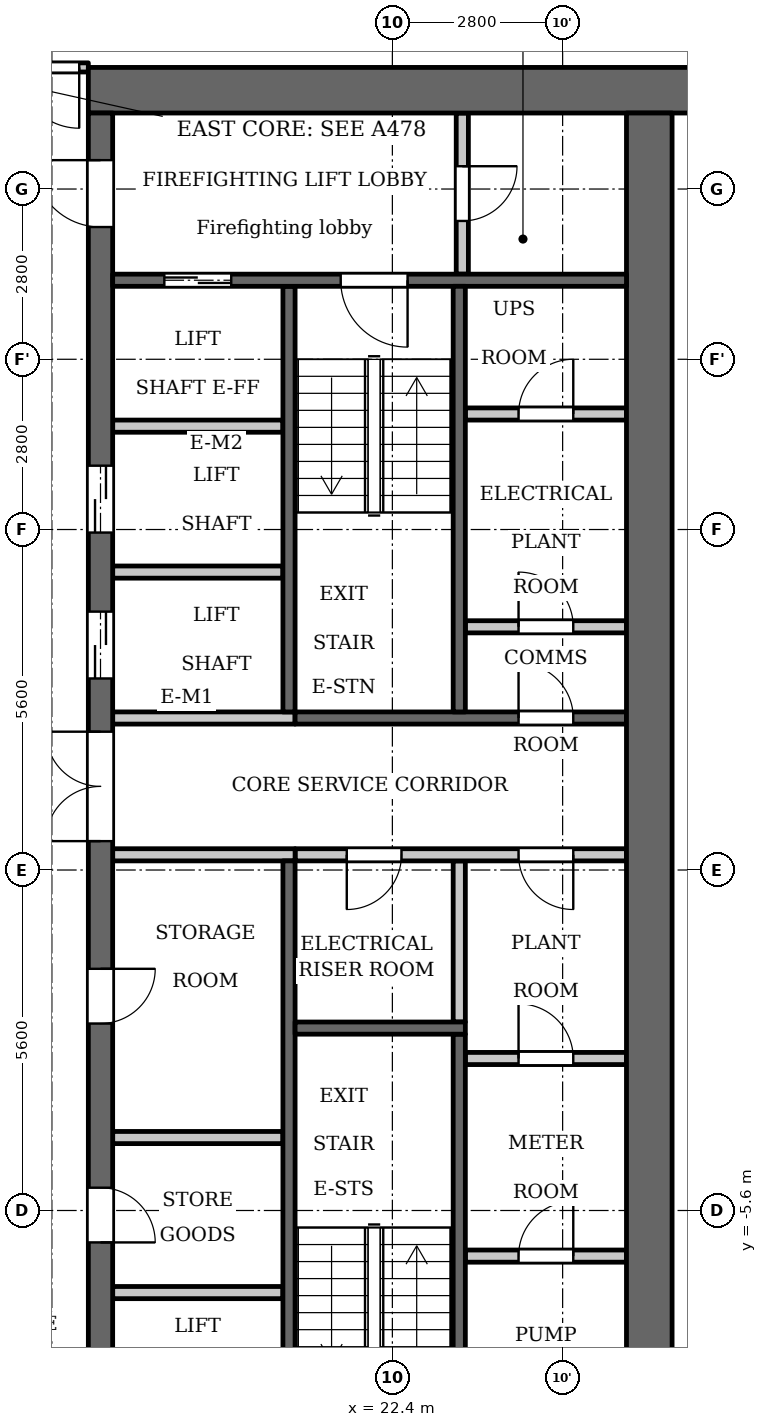
"""IFC4 building model, lengths in metres.
Left out: names, types, materials, properties, quantities, classifications, styles, units other than length and angle.
Written with IfcOpenShell. Run it as: python <this file> out.ifc"""

import sys

from ifc_helpers import new_model, si_unit, direction, frame, frame_2d, origin, place, context, subcontext, project, spatial, rectangle, extrude, element, fill, save


model = new_model("IFC4")
c1 = context("Model", 3, precision=1e-05, world=origin(), true_north=direction((0.0, 1.0)))
c2 = subcontext(c1, "Body", "Model", "MODEL_VIEW")
j1 = project(units=[si_unit("LENGTHUNIT", "METRE"), si_unit("PLANEANGLEUNIT", "RADIAN")], contexts=[c1])
p1 = place(None, origin())
s1 = spatial("IfcSite", under=j1, at=p1, CompositionType="ELEMENT")
p2 = place(p1, origin())
s2 = spatial("IfcBuilding", under=s1, at=p2, CompositionType="ELEMENT")
p3 = place(p2, frame((0.0, 0.0, 146.6)))
s3 = spatial("IfcBuildingStorey", under=s2, at=p3, CompositionType="ELEMENT", Elevation=146.6)
p4 = place(p3, frame((23.5, -2.5, 0.0), z_axis=(0.0, 0.0, 1.0), x_axis=(0.0, 1.0, 0.0)))
e1 = element("IfcWall", 1, at=p4, inside=s3, PredefinedType="PARTITIONING", context=c2, shape_type="SweptSolid", body=[
    extrude(rectangle(XDim=2.65, YDim=0.2, at=frame_2d((1.325, 0.0))), origin(), (0.0, 0.0, 1.0), 3.2),
])
p5 = place(p3, frame((20.7, 2.6, 0.0), z_axis=(0.0, 0.0, 1.0), x_axis=(0.0, 1.0, 0.0)))
e2 = element("IfcWall", 2, at=p5, inside=s3, PredefinedType="SHEAR", context=c2, shape_type="SweptSolid", body=[
    extrude(rectangle(XDim=7.0, YDim=0.2, at=frame_2d((3.5, 0.0))), origin(), (0.0, 0.0, 1.0), 3.2),
])
p6 = place(p3, frame((20.7, -9.6, 0.0), z_axis=(0.0, 0.0, 1.0), x_axis=(0.0, 1.0, 0.0)))
e3 = element("IfcWall", 3, at=p6, inside=s3, PredefinedType="SHEAR", context=c2, shape_type="SweptSolid", body=[
    extrude(rectangle(XDim=9.75, YDim=0.2, at=frame_2d((4.875, 0.0))), origin(), (0.0, 0.0, 1.0), 3.2),
])
p7 = place(p3, frame((20.8, 2.5, 0.0), z_axis=(0.0, 0.0, 1.0), x_axis=(1.0, 0.0, 0.0)))
e4 = element("IfcWall", 4, at=p7, inside=s3, PredefinedType="SHEAR", context=c2, shape_type="SweptSolid", body=[
    extrude(rectangle(XDim=5.45, YDim=0.2, at=frame_2d((2.725, 0.0))), origin(), (0.0, 0.0, 1.0), 3.2),
])
p8 = place(p7, frame((3.675, 0.0, 0.0)))
e5 = element("IfcOpeningElement", 5, at=p8, cuts=e4, PredefinedType="OPENING", context=c2, shape_type="SweptSolid", body=[
    extrude(rectangle(XDim=0.9, YDim=2.1, at=frame_2d((0.45, 1.05))), frame((0.0, 0.11, 0.0), z_axis=(0.0, -1.0, 0.0), x_axis=(1.0, 0.0, 0.0)), (0.0, 0.0, 1.0), 0.22),
])
p9 = place(p3, frame((20.8, 0.25, 0.0), z_axis=(0.0, 0.0, 1.0), x_axis=(1.0, 0.0, 0.0)))
e6 = element("IfcWall", 6, at=p9, inside=s3, PredefinedType="PARTITIONING", context=c2, shape_type="SweptSolid", body=[
    extrude(rectangle(XDim=5.45, YDim=0.2, at=frame_2d((2.725, 0.0))), origin(), (0.0, 0.0, 1.0), 3.2),
])
p10 = place(p9, frame((0.85, 0.0, 0.0)))
e7 = element("IfcOpeningElement", 7, at=p10, cuts=e6, PredefinedType="OPENING", context=c2, shape_type="SweptSolid", body=[
    extrude(rectangle(XDim=0.9, YDim=2.1, at=frame_2d((0.45, 1.05))), frame((0.0, 0.11, 0.0), z_axis=(0.0, -1.0, 0.0), x_axis=(1.0, 0.0, 0.0)), (0.0, 0.0, 1.0), 0.22),
])
p11 = place(p9, frame((3.675, 0.0, 0.0)))
e8 = element("IfcOpeningElement", 8, at=p11, cuts=e6, PredefinedType="OPENING", context=c2, shape_type="SweptSolid", body=[
    extrude(rectangle(XDim=0.9, YDim=2.1, at=frame_2d((0.45, 1.05))), frame((0.0, 0.11, 0.0), z_axis=(0.0, -1.0, 0.0), x_axis=(1.0, 0.0, 0.0)), (0.0, 0.0, 1.0), 0.22),
])
p12 = place(p3, frame((17.4, 12.825, 0.0), z_axis=(0.0, 0.0, 1.0), x_axis=(1.0, 0.0, 0.0)))
e9 = element("IfcWall", 9, at=p12, inside=s3, PredefinedType="SHEAR", context=c2, shape_type="SweptSolid", body=[
    extrude(rectangle(XDim=10.4, YDim=0.75, at=frame_2d((5.2, 0.0))), origin(), (0.0, 0.0, 1.0), 3.2),
])
p13 = place(p3, frame((17.8, -4.4, 0.0), z_axis=(0.0, 0.0, 1.0), x_axis=(1.0, 0.0, 0.0)))
e10 = element("IfcWall", 10, at=p13, inside=s3, PredefinedType="PARTITIONING", context=c2, shape_type="SweptSolid", body=[
    extrude(rectangle(XDim=2.8, YDim=0.2, at=frame_2d((1.4, 0.0))), origin(), (0.0, 0.0, 1.0), 3.2),
])
p14 = place(p3, frame((17.6, -12.45, 0.0), z_axis=(0.0, 0.0, 1.0), x_axis=(0.0, 1.0, 0.0)))
e11 = element("IfcWall", 11, at=p14, inside=s3, PredefinedType="SHEAR", context=c2, shape_type="SweptSolid", body=[
    extrude(rectangle(XDim=24.9, YDim=0.4, at=frame_2d((12.45, 0.0))), origin(), (0.0, 0.0, 1.0), 3.2),
])
p15 = place(p14, frame((6.325, 0.0, 0.0)))
e12 = element("IfcOpeningElement", 12, at=p15, cuts=e11, PredefinedType="OPENING", context=c2, shape_type="SweptSolid", body=[
    extrude(rectangle(XDim=0.9, YDim=2.1, at=frame_2d((0.45, 1.05))), frame((0.0, 0.21, 0.0), z_axis=(0.0, -1.0, 0.0), x_axis=(1.0, 0.0, 0.0)), (0.0, 0.0, 1.0), 0.42),
])
p16 = place(p14, frame((9.925, 0.0, 0.0)))
e13 = element("IfcOpeningElement", 13, at=p16, cuts=e11, PredefinedType="OPENING", context=c2, shape_type="SweptSolid", body=[
    extrude(rectangle(XDim=0.9, YDim=2.1, at=frame_2d((0.45, 1.05))), frame((0.0, 0.21, 0.0), z_axis=(0.0, -1.0, 0.0), x_axis=(1.0, 0.0, 0.0)), (0.0, 0.0, 1.0), 0.42),
])
p17 = place(p14, frame((15.6, 0.0, 0.0)))
e14 = element("IfcOpeningElement", 14, at=p17, cuts=e11, PredefinedType="OPENING", context=c2, shape_type="SweptSolid", body=[
    extrude(rectangle(XDim=1.1, YDim=2.1, at=frame_2d((0.55, 1.05))), frame((0.0, 0.21, 0.0), z_axis=(0.0, -1.0, 0.0), x_axis=(1.0, 0.0, 0.0)), (0.0, 0.0, 1.0), 0.42),
])
p18 = place(p14, frame((18.0, 0.0, 0.0)))
e15 = element("IfcOpeningElement", 15, at=p18, cuts=e11, PredefinedType="OPENING", context=c2, shape_type="SweptSolid", body=[
    extrude(rectangle(XDim=1.1, YDim=2.1, at=frame_2d((0.55, 1.05))), frame((0.0, 0.21, 0.0), z_axis=(0.0, -1.0, 0.0), x_axis=(1.0, 0.0, 0.0)), (0.0, 0.0, 1.0), 0.42),
])
p19 = place(p14, frame((23.025, 0.0, 0.0)))
e16 = element("IfcOpeningElement", 16, at=p19, cuts=e11, PredefinedType="OPENING", context=c2, shape_type="SweptSolid", body=[
    extrude(rectangle(XDim=1.1, YDim=2.1, at=frame_2d((0.55, 1.05))), frame((0.0, 0.21, 0.0), z_axis=(0.0, -1.0, 0.0), x_axis=(1.0, 0.0, 0.0)), (0.0, 0.0, 1.0), 0.42),
])
p20 = place(p14, frame((0.775, 0.0, 0.0)))
e17 = element("IfcOpeningElement", 17, at=p20, cuts=e11, PredefinedType="OPENING", context=c2, shape_type="SweptSolid", body=[
    extrude(rectangle(XDim=1.1, YDim=2.1, at=frame_2d((0.55, 1.05))), frame((0.0, 0.21, 0.0), z_axis=(0.0, -1.0, 0.0), x_axis=(1.0, 0.0, 0.0)), (0.0, 0.0, 1.0), 0.42),
])
p21 = place(p14, frame((12.925, 0.0, 0.0)))
e18 = element("IfcOpeningElement", 18, at=p21, cuts=e11, PredefinedType="OPENING", context=c2, shape_type="SweptSolid", body=[
    extrude(rectangle(XDim=1.8, YDim=2.1, at=frame_2d((0.9, 1.05))), frame((0.0, 0.21, 0.0), z_axis=(0.0, -1.0, 0.0), x_axis=(1.0, 0.0, 0.0)), (0.0, 0.0, 1.0), 0.42),
])
p22 = place(p3, frame((26.625, -12.45, 0.0), z_axis=(0.0, 0.0, 1.0), x_axis=(0.0, 1.0, 0.0)))
e19 = element("IfcWall", 19, at=p22, inside=s3, PredefinedType="SHEAR", context=c2, shape_type="SweptSolid", body=[
    extrude(rectangle(XDim=24.9, YDim=0.75, at=frame_2d((12.45, 0.0))), origin(), (0.0, 0.0, 1.0), 3.2),
])
p23 = place(p3, frame((23.55, 9.8, 0.0), z_axis=(0.0, 0.0, 1.0), x_axis=(0.0, 1.0, 0.0)))
e20 = element("IfcWall", 20, at=p23, inside=s3, PredefinedType="PARTITIONING", context=c2, shape_type="SweptSolid", body=[
    extrude(rectangle(XDim=2.65, YDim=0.2, at=frame_2d((1.325, 0.0))), origin(), (0.0, 0.0, 1.0), 3.2),
])
p24 = place(p23, frame((0.875, 0.0, 0.0)))
e21 = element("IfcOpeningElement", 21, at=p24, cuts=e20, PredefinedType="OPENING", context=c2, shape_type="SweptSolid", body=[
    extrude(rectangle(XDim=0.9, YDim=2.1, at=frame_2d((0.45, 1.05))), frame((0.0, 0.11, 0.0), z_axis=(0.0, -1.0, 0.0), x_axis=(1.0, 0.0, 0.0)), (0.0, 0.0, 1.0), 0.22),
])
p25 = place(p3, frame((23.6, -6.35, 0.0), z_axis=(0.0, 0.0, 1.0), x_axis=(1.0, 0.0, 0.0)))
e22 = element("IfcWall", 22, at=p25, inside=s3, PredefinedType="PARTITIONING", context=c2, shape_type="SweptSolid", body=[
    extrude(rectangle(XDim=2.65, YDim=0.2, at=frame_2d((1.325, 0.0))), origin(), (0.0, 0.0, 1.0), 3.2),
])
p26 = place(p25, frame((0.875, 0.0, 0.0)))
e23 = element("IfcOpeningElement", 23, at=p26, cuts=e22, PredefinedType="OPENING", context=c2, shape_type="SweptSolid", body=[
    extrude(rectangle(XDim=0.9, YDim=2.1, at=frame_2d((0.45, 1.05))), frame((0.0, 0.11, 0.0), z_axis=(0.0, -1.0, 0.0), x_axis=(1.0, 0.0, 0.0)), (0.0, 0.0, 1.0), 0.22),
])
p27 = place(p3, frame((23.6, -3.1, 0.0), z_axis=(0.0, 0.0, 1.0), x_axis=(1.0, 0.0, 0.0)))
e24 = element("IfcWall", 24, at=p27, inside=s3, PredefinedType="PARTITIONING", context=c2, shape_type="SweptSolid", body=[
    extrude(rectangle(XDim=2.65, YDim=0.2, at=frame_2d((1.325, 0.0))), origin(), (0.0, 0.0, 1.0), 3.2),
])
p28 = place(p27, frame((0.875, 0.0, 0.0)))
e25 = element("IfcOpeningElement", 25, at=p28, cuts=e24, PredefinedType="OPENING", context=c2, shape_type="SweptSolid", body=[
    extrude(rectangle(XDim=0.9, YDim=2.1, at=frame_2d((0.45, 1.05))), frame((0.0, 0.11, 0.0), z_axis=(0.0, -1.0, 0.0), x_axis=(1.0, 0.0, 0.0)), (0.0, 0.0, 1.0), 0.22),
])
p29 = place(p3, frame((23.6, 4.0, 0.0), z_axis=(0.0, 0.0, 1.0), x_axis=(1.0, 0.0, 0.0)))
e26 = element("IfcWall", 26, at=p29, inside=s3, PredefinedType="PARTITIONING", context=c2, shape_type="SweptSolid", body=[
    extrude(rectangle(XDim=2.65, YDim=0.2, at=frame_2d((1.325, 0.0))), origin(), (0.0, 0.0, 1.0), 3.2),
])
p30 = place(p29, frame((0.875, 0.0, 0.0)))
e27 = element("IfcOpeningElement", 27, at=p30, cuts=e26, PredefinedType="OPENING", context=c2, shape_type="SweptSolid", body=[
    extrude(rectangle(XDim=0.9, YDim=2.1, at=frame_2d((0.45, 1.05))), frame((0.0, 0.11, 0.0), z_axis=(0.0, -1.0, 0.0), x_axis=(1.0, 0.0, 0.0)), (0.0, 0.0, 1.0), 0.22),
])
p31 = place(p3, frame((23.6, 7.5, 0.0), z_axis=(0.0, 0.0, 1.0), x_axis=(1.0, 0.0, 0.0)))
e28 = element("IfcWall", 28, at=p31, inside=s3, PredefinedType="PARTITIONING", context=c2, shape_type="SweptSolid", body=[
    extrude(rectangle(XDim=2.65, YDim=0.2, at=frame_2d((1.325, 0.0))), origin(), (0.0, 0.0, 1.0), 3.2),
])
p32 = place(p31, frame((0.875, 0.0, 0.0)))
e29 = element("IfcOpeningElement", 29, at=p32, cuts=e28, PredefinedType="OPENING", context=c2, shape_type="SweptSolid", body=[
    extrude(rectangle(XDim=0.9, YDim=2.1, at=frame_2d((0.45, 1.05))), frame((0.0, 0.11, 0.0), z_axis=(0.0, -1.0, 0.0), x_axis=(1.0, 0.0, 0.0)), (0.0, 0.0, 1.0), 0.22),
])
p33 = place(p3, frame((17.8, -6.95, 0.0), z_axis=(0.0, 0.0, 1.0), x_axis=(1.0, 0.0, 0.0)))
e30 = element("IfcWall", 30, at=p33, inside=s3, PredefinedType="PARTITIONING", context=c2, shape_type="SweptSolid", body=[
    extrude(rectangle(XDim=2.8, YDim=0.2, at=frame_2d((1.4, 0.0))), origin(), (0.0, 0.0, 1.0), 3.2),
])
for number, where, z_axis, x_axis in (
    (31, (17.8, 0.25, 0.0), (0.0, 0.0, 1.0), (1.0, 0.0, 0.0)),
    (32, (17.8, 2.5, 0.0), (0.0, 0.0, 1.0), (1.0, 0.0, 0.0)),
):
    element("IfcWall", number, at=place(p3, frame(where, z_axis=z_axis, x_axis=x_axis)), inside=s3, PredefinedType="PARTITIONING", context=c2, shape_type="SweptSolid", body=[
        extrude(rectangle(XDim=3.0, YDim=0.2, at=frame_2d((1.5, 0.0))), origin(), (0.0, 0.0, 1.0), 3.2),
    ])
for number, where, z_axis, x_axis in (
    (33, (17.8, 4.9, 0.0), (0.0, 0.0, 1.0), (1.0, 0.0, 0.0)),
    (34, (17.8, 7.3, 0.0), (0.0, 0.0, 1.0), (1.0, 0.0, 0.0)),
):
    element("IfcWall", number, at=place(p3, frame(where, z_axis=z_axis, x_axis=x_axis)), inside=s3, PredefinedType="PARTITIONING", context=c2, shape_type="SweptSolid", body=[
        extrude(rectangle(XDim=2.8, YDim=0.2, at=frame_2d((1.4, 0.0))), origin(), (0.0, 0.0, 1.0), 3.2),
    ])
p34 = place(p3, frame((17.8, 9.7, 0.0), z_axis=(0.0, 0.0, 1.0), x_axis=(1.0, 0.0, 0.0)))
e35 = element("IfcWall", 35, at=p34, inside=s3, PredefinedType="SHEAR", context=c2, shape_type="SweptSolid", body=[
    extrude(rectangle(XDim=8.45, YDim=0.2, at=frame_2d((4.225, 0.0))), origin(), (0.0, 0.0, 1.0), 3.2),
])
p35 = place(p34, frame((0.85, 0.0, 0.0)))
e36 = element("IfcOpeningElement", 36, at=p35, cuts=e35, PredefinedType="OPENING", context=c2, shape_type="SweptSolid", body=[
    extrude(rectangle(XDim=1.1, YDim=2.1, at=frame_2d((0.55, 1.05))), frame((0.0, 0.11, 0.0), z_axis=(0.0, -1.0, 0.0), x_axis=(1.0, 0.0, 0.0)), (0.0, 0.0, 1.0), 0.22),
])
p36 = place(p34, frame((3.75, 0.0, 0.0)))
e37 = element("IfcOpeningElement", 37, at=p36, cuts=e35, PredefinedType="OPENING", context=c2, shape_type="SweptSolid", body=[
    extrude(rectangle(XDim=1.1, YDim=2.1, at=frame_2d((0.55, 1.05))), frame((0.0, 0.11, 0.0), z_axis=(0.0, -1.0, 0.0), x_axis=(1.0, 0.0, 0.0)), (0.0, 0.0, 1.0), 0.22),
])
p37 = place(p3, frame((23.5, 2.6, 0.0), z_axis=(0.0, 0.0, 1.0), x_axis=(0.0, 1.0, 0.0)))
e38 = element("IfcWall", 38, at=p37, inside=s3, PredefinedType="SHEAR", context=c2, shape_type="SweptSolid", body=[
    extrude(rectangle(XDim=7.0, YDim=0.2, at=frame_2d((3.5, 0.0))), origin(), (0.0, 0.0, 1.0), 3.2),
])
p38 = place(p3, frame((23.5, -9.6, 0.0), z_axis=(0.0, 0.0, 1.0), x_axis=(0.0, 1.0, 0.0)))
e39 = element("IfcWall", 39, at=p38, inside=s3, PredefinedType="SHEAR", context=c2, shape_type="SweptSolid", body=[
    extrude(rectangle(XDim=6.9, YDim=0.2, at=frame_2d((3.45, 0.0))), origin(), (0.0, 0.0, 1.0), 3.2),
])
p39 = place(p3, frame((20.8, -2.6, 0.0), z_axis=(0.0, 0.0, 1.0), x_axis=(1.0, 0.0, 0.0)))
e40 = element("IfcWall", 40, at=p39, inside=s3, PredefinedType="SHEAR", context=c2, shape_type="SweptSolid", body=[
    extrude(rectangle(XDim=2.8, YDim=0.2, at=frame_2d((1.4, 0.0))), origin(), (0.0, 0.0, 1.0), 3.2),
])
p40 = place(p3, frame((-17.4, 13.2, 0.0), z_axis=(0.0, 0.0, 1.0), x_axis=(1.0, 0.0, 0.0)))
e41 = element("IfcWall", 41, at=p40, inside=s3, PredefinedType="PARTITIONING", context=c2, shape_type="SweptSolid", body=[
    extrude(rectangle(XDim=34.8, YDim=0.15, at=frame_2d((17.4, 0.0))), origin(), (0.0, 0.0, 1.0), 3.2),
])
p41 = place(p40, frame((0.25, 0.0, 0.0)))
e42 = element("IfcOpeningElement", 42, at=p41, cuts=e41, PredefinedType="OPENING", context=c2, shape_type="SweptSolid", body=[
    extrude(rectangle(XDim=1.0, YDim=2.1, at=frame_2d((0.5, 1.05))), frame((0.0, 0.085, 0.0), z_axis=(0.0, -1.0, 0.0), x_axis=(1.0, 0.0, 0.0)), (0.0, 0.0, 1.0), 0.17),
])
p42 = place(p40, frame((33.65, 0.0, 0.0)))
e43 = element("IfcOpeningElement", 43, at=p42, cuts=e41, PredefinedType="OPENING", context=c2, shape_type="SweptSolid", body=[
    extrude(rectangle(XDim=1.0, YDim=2.1, at=frame_2d((0.5, 1.05))), frame((0.0, 0.085, 0.0), z_axis=(0.0, -1.0, 0.0), x_axis=(1.0, 0.0, 0.0)), (0.0, 0.0, 1.0), 0.17),
])
p43 = place(p40, frame((13.75, 0.0, 0.0)))
e44 = element("IfcOpeningElement", 44, at=p43, cuts=e41, PredefinedType="OPENING", context=c2, shape_type="SweptSolid", body=[
    extrude(rectangle(XDim=1.0, YDim=2.1, at=frame_2d((0.5, 1.05))), frame((0.0, 0.085, 0.0), z_axis=(0.0, -1.0, 0.0), x_axis=(1.0, 0.0, 0.0)), (0.0, 0.0, 1.0), 0.17),
])
p44 = place(p15, origin())
e45 = element("IfcDoor", 45, at=p44, inside=s3, OperationType="SINGLE_SWING_LEFT", PredefinedType="DOOR", context=c2, shape_type="SweptSolid", body=[
    extrude(rectangle(XDim=0.9, YDim=2.1, at=frame_2d((0.45, 1.05))), frame((0.0, 0.025, 0.0), z_axis=(0.0, -1.0, 0.0), x_axis=(1.0, 0.0, 0.0)), (0.0, 0.0, 1.0), 0.05),
])
fill(e12, e45)
p45 = place(p16, origin())
e46 = element("IfcDoor", 46, at=p45, inside=s3, OperationType="SINGLE_SWING_RIGHT", PredefinedType="DOOR", context=c2, shape_type="SweptSolid", body=[
    extrude(rectangle(XDim=0.9, YDim=2.1, at=frame_2d((0.45, 1.05))), frame((0.0, 0.025, 0.0), z_axis=(0.0, -1.0, 0.0), x_axis=(1.0, 0.0, 0.0)), (0.0, 0.0, 1.0), 0.05),
])
fill(e13, e46)
p46 = place(p17, origin())
e47 = element("IfcDoor", 47, at=p46, inside=s3, OperationType="DOUBLE_DOOR_SLIDING", PredefinedType="DOOR", context=c2, shape_type="SweptSolid", body=[
    extrude(rectangle(XDim=1.1, YDim=2.1, at=frame_2d((0.55, 1.05))), frame((0.0, 0.025, 0.0), z_axis=(0.0, -1.0, 0.0), x_axis=(1.0, 0.0, 0.0)), (0.0, 0.0, 1.0), 0.05),
])
fill(e14, e47)
p47 = place(p18, origin())
e48 = element("IfcDoor", 48, at=p47, inside=s3, OperationType="DOUBLE_DOOR_SLIDING", PredefinedType="DOOR", context=c2, shape_type="SweptSolid", body=[
    extrude(rectangle(XDim=1.1, YDim=2.1, at=frame_2d((0.55, 1.05))), frame((0.0, 0.025, 0.0), z_axis=(0.0, -1.0, 0.0), x_axis=(1.0, 0.0, 0.0)), (0.0, 0.0, 1.0), 0.05),
])
fill(e15, e48)
p48 = place(p35, origin())
e49 = element("IfcDoor", 49, at=p48, inside=s3, OperationType="DOUBLE_DOOR_SLIDING", PredefinedType="DOOR", context=c2, shape_type="SweptSolid", body=[
    extrude(rectangle(XDim=1.1, YDim=2.1, at=frame_2d((0.55, 1.05))), frame((0.0, 0.025, 0.0), z_axis=(0.0, -1.0, 0.0), x_axis=(1.0, 0.0, 0.0)), (0.0, 0.0, 1.0), 0.05),
])
fill(e36, e49)
p49 = place(p19, origin())
e50 = element("IfcDoor", 50, at=p49, inside=s3, OperationType="SINGLE_SWING_LEFT", PredefinedType="DOOR", context=c2, shape_type="SweptSolid", body=[
    extrude(rectangle(XDim=1.1, YDim=2.1, at=frame_2d((0.55, 1.05))), frame((0.0, 0.025, 0.0), z_axis=(0.0, -1.0, 0.0), x_axis=(1.0, 0.0, 0.0)), (0.0, 0.0, 1.0), 0.05),
])
fill(e16, e50)
p50 = place(p24, origin())
e51 = element("IfcDoor", 51, at=p50, inside=s3, OperationType="SINGLE_SWING_RIGHT", PredefinedType="DOOR", context=c2, shape_type="SweptSolid", body=[
    extrude(rectangle(XDim=0.9, YDim=2.1, at=frame_2d((0.45, 1.05))), frame((0.0, 0.025, 0.0), z_axis=(0.0, -1.0, 0.0), x_axis=(1.0, 0.0, 0.0)), (0.0, 0.0, 1.0), 0.05),
])
fill(e21, e51)
p51 = place(p36, origin())
e52 = element("IfcDoor", 52, at=p51, inside=s3, OperationType="SINGLE_SWING_RIGHT", PredefinedType="DOOR", context=c2, shape_type="SweptSolid", body=[
    extrude(rectangle(XDim=1.1, YDim=2.1, at=frame_2d((0.55, 1.05))), frame((0.0, 0.025, 0.0), z_axis=(0.0, -1.0, 0.0), x_axis=(1.0, 0.0, 0.0)), (0.0, 0.0, 1.0), 0.05),
])
fill(e37, e52)
p52 = place(p21, origin())
e53 = element("IfcDoor", 53, at=p52, inside=s3, OperationType="DOUBLE_DOOR_SINGLE_SWING", PredefinedType="DOOR", context=c2, shape_type="SweptSolid", body=[
    extrude(rectangle(XDim=1.8, YDim=2.1, at=frame_2d((0.9, 1.05))), frame((0.0, 0.025, 0.0), z_axis=(0.0, -1.0, 0.0), x_axis=(1.0, 0.0, 0.0)), (0.0, 0.0, 1.0), 0.05),
])
fill(e18, e53)
p53 = place(p10, origin())
e54 = element("IfcDoor", 54, at=p53, inside=s3, OperationType="SINGLE_SWING_LEFT", PredefinedType="DOOR", context=c2, shape_type="SweptSolid", body=[
    extrude(rectangle(XDim=0.9, YDim=2.1, at=frame_2d((0.45, 1.05))), frame((0.0, 0.025, 0.0), z_axis=(0.0, -1.0, 0.0), x_axis=(1.0, 0.0, 0.0)), (0.0, 0.0, 1.0), 0.05),
])
fill(e7, e54)
p54 = place(p26, origin())
e55 = element("IfcDoor", 55, at=p54, inside=s3, OperationType="SINGLE_SWING_LEFT", PredefinedType="DOOR", context=c2, shape_type="SweptSolid", body=[
    extrude(rectangle(XDim=0.9, YDim=2.1, at=frame_2d((0.45, 1.05))), frame((0.0, 0.025, 0.0), z_axis=(0.0, -1.0, 0.0), x_axis=(1.0, 0.0, 0.0)), (0.0, 0.0, 1.0), 0.05),
])
fill(e23, e55)
p55 = place(p28, origin())
e56 = element("IfcDoor", 56, at=p55, inside=s3, OperationType="SINGLE_SWING_RIGHT", PredefinedType="DOOR", context=c2, shape_type="SweptSolid", body=[
    extrude(rectangle(XDim=0.9, YDim=2.1, at=frame_2d((0.45, 1.05))), frame((0.0, 0.025, 0.0), z_axis=(0.0, -1.0, 0.0), x_axis=(1.0, 0.0, 0.0)), (0.0, 0.0, 1.0), 0.05),
])
fill(e25, e56)
p56 = place(p11, origin())
e57 = element("IfcDoor", 57, at=p56, inside=s3, OperationType="SINGLE_SWING_RIGHT", PredefinedType="DOOR", context=c2, shape_type="SweptSolid", body=[
    extrude(rectangle(XDim=0.9, YDim=2.1, at=frame_2d((0.45, 1.05))), frame((0.0, 0.025, 0.0), z_axis=(0.0, -1.0, 0.0), x_axis=(1.0, 0.0, 0.0)), (0.0, 0.0, 1.0), 0.05),
])
fill(e8, e57)
p57 = place(p30, origin())
e58 = element("IfcDoor", 58, at=p57, inside=s3, OperationType="SINGLE_SWING_RIGHT", PredefinedType="DOOR", context=c2, shape_type="SweptSolid", body=[
    extrude(rectangle(XDim=0.9, YDim=2.1, at=frame_2d((0.45, 1.05))), frame((0.0, 0.025, 0.0), z_axis=(0.0, -1.0, 0.0), x_axis=(1.0, 0.0, 0.0)), (0.0, 0.0, 1.0), 0.05),
])
fill(e27, e58)
p58 = place(p32, origin())
e59 = element("IfcDoor", 59, at=p58, inside=s3, OperationType="SINGLE_SWING_LEFT", PredefinedType="DOOR", context=c2, shape_type="SweptSolid", body=[
    extrude(rectangle(XDim=0.9, YDim=2.1, at=frame_2d((0.45, 1.05))), frame((0.0, 0.025, 0.0), z_axis=(0.0, -1.0, 0.0), x_axis=(1.0, 0.0, 0.0)), (0.0, 0.0, 1.0), 0.05),
])
fill(e29, e59)
p59 = place(p8, origin())
e60 = element("IfcDoor", 60, at=p59, inside=s3, OperationType="SINGLE_SWING_RIGHT", PredefinedType="DOOR", context=c2, shape_type="SweptSolid", body=[
    extrude(rectangle(XDim=0.9, YDim=2.1, at=frame_2d((0.45, 1.05))), frame((0.0, 0.025, 0.0), z_axis=(0.0, -1.0, 0.0), x_axis=(1.0, 0.0, 0.0)), (0.0, 0.0, 1.0), 0.05),
])
fill(e5, e60)
p60 = place(p42, origin())
e61 = element("IfcDoor", 61, at=p60, inside=s3, OperationType="SINGLE_SWING_RIGHT", PredefinedType="DOOR", context=c2, shape_type="SweptSolid", body=[
    extrude(rectangle(XDim=1.0, YDim=2.1, at=frame_2d((0.5, 1.05))), frame((0.0, 0.025, 0.0), z_axis=(0.0, -1.0, 0.0), x_axis=(1.0, 0.0, 0.0)), (0.0, 0.0, 1.0), 0.05),
])
fill(e43, e61)
save(model, sys.argv[1])
